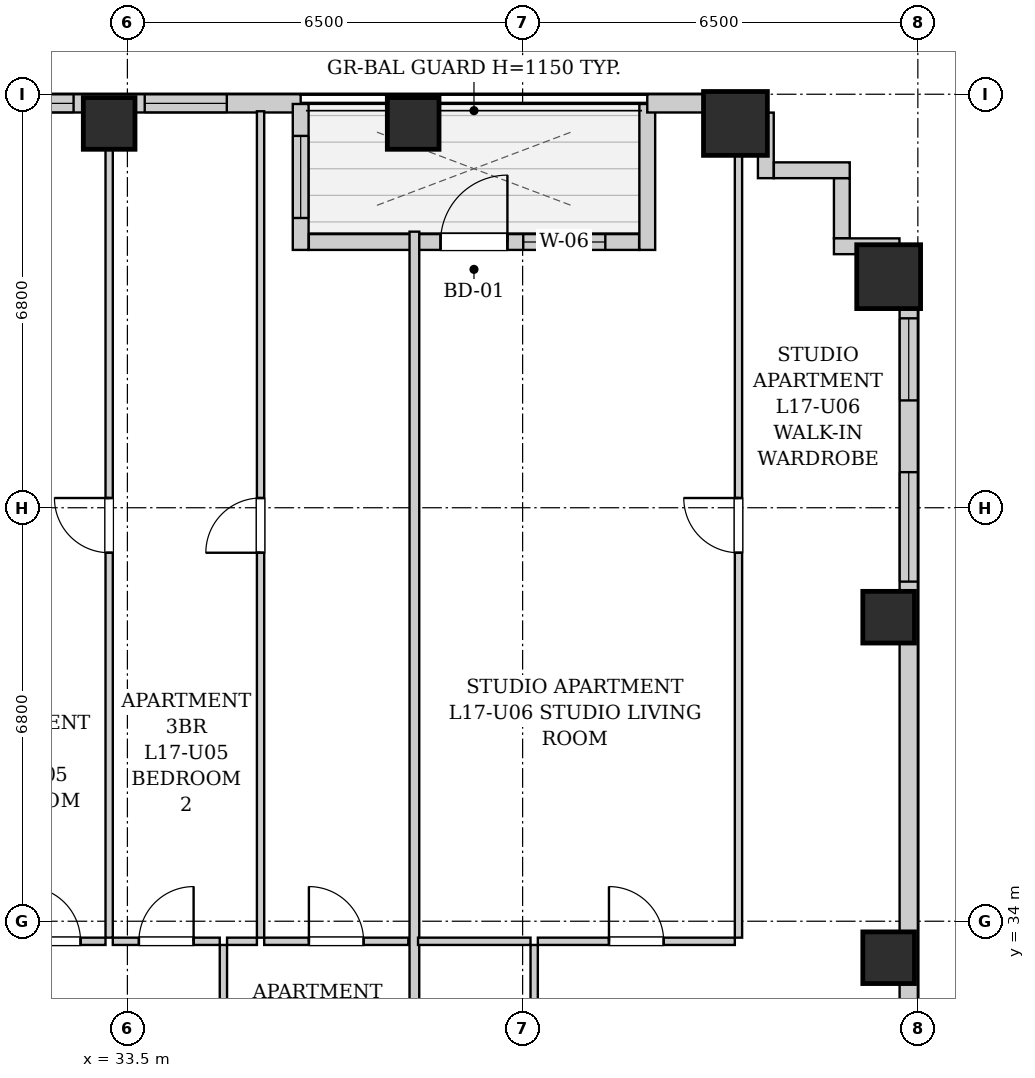
"""IFC4 building model, lengths in metres.
Left out: names, types, materials, properties, quantities, classifications, styles, units other than length and angle.
Written with IfcOpenShell. Run it as: python <this file> out.ifc"""

import sys

from ifc_helpers import new_model, si_unit, direction, frame, frame_2d, origin, origin_2d, place, context, subcontext, project, spatial, rectangle, extrude, element, fill, save


model = new_model("IFC4")
c1 = context("Model", 3, precision=1e-05, world=origin(), true_north=direction((0.0, 1.0)))
c2 = subcontext(c1, "Body", "Model", "MODEL_VIEW")
j1 = project(units=[si_unit("LENGTHUNIT", "METRE"), si_unit("PLANEANGLEUNIT", "RADIAN")], contexts=[c1])
p1 = place(None, origin())
s1 = spatial("IfcSite", under=j1, at=p1, CompositionType="ELEMENT")
p2 = place(p1, origin())
s2 = spatial("IfcBuilding", under=s1, at=p2, CompositionType="ELEMENT")
p3 = place(p2, frame((0.0, 0.0, 64.2)))
s3 = spatial("IfcBuildingStorey", under=s2, at=p3, CompositionType="ELEMENT", Elevation=64.2)
for number, where, z_axis, x_axis in (
    (1, (33.2, 47.12, 0.0), (0.0, 0.0, 1.0), (1.0, 0.0, 0.0)),
    (2, (38.2, 47.12, 0.0), (0.0, 0.0, 1.0), (1.0, 0.0, 0.0)),
):
    element("IfcColumn", number, at=place(p3, frame(where, z_axis=z_axis, x_axis=x_axis)), inside=s3, PredefinedType="COLUMN", context=c2, shape_type="SweptSolid", body=[
        extrude(rectangle(XDim=0.85, YDim=0.85, at=origin_2d()), origin(), (0.0, 0.0, 1.0), 3.2),
    ])
p4 = place(p3, frame((43.5, 47.12, 0.0), z_axis=(0.0, 0.0, 1.0), x_axis=(1.0, 0.0, 0.0)))
e3 = element("IfcColumn", 3, at=p4, inside=s3, PredefinedType="COLUMN", context=c2, shape_type="SweptSolid", body=[
    extrude(rectangle(XDim=1.05, YDim=1.05, at=origin_2d()), origin(), (0.0, 0.0, 1.0), 3.2),
])
for number, where, z_axis, x_axis in (
    (4, (46.02, 33.4, 0.0), (0.0, 0.0, 1.0), (1.0, 0.0, 0.0)),
    (5, (46.02, 39.0, 0.0), (0.0, 0.0, 1.0), (1.0, 0.0, 0.0)),
):
    element("IfcColumn", number, at=place(p3, frame(where, z_axis=z_axis, x_axis=x_axis)), inside=s3, PredefinedType="COLUMN", context=c2, shape_type="SweptSolid", body=[
        extrude(rectangle(XDim=0.85, YDim=0.85, at=origin_2d()), origin(), (0.0, 0.0, 1.0), 3.2),
    ])
p5 = place(p3, frame((46.02, 44.6, 0.0), z_axis=(0.0, 0.0, 1.0), x_axis=(1.0, 0.0, 0.0)))
e6 = element("IfcColumn", 6, at=p5, inside=s3, PredefinedType="COLUMN", context=c2, shape_type="SweptSolid", body=[
    extrude(rectangle(XDim=1.05, YDim=1.05, at=origin_2d()), origin(), (0.0, 0.0, 1.0), 3.2),
])
p6 = place(p3, frame((10.0, 47.45, 0.0), z_axis=(0.0, 0.0, 1.0), x_axis=(1.0, 0.0, 0.0)))
e7 = element("IfcWall", 7, at=p6, inside=s3, PredefinedType="SOLIDWALL", context=c2, shape_type="SweptSolid", body=[
    extrude(rectangle(XDim=26.35, YDim=0.3, at=frame_2d((13.175, 0.0))), origin(), (0.0, 0.0, 1.0), 1.975),
])
p7 = place(p6, frame((1.735, 0.0, 0.55)))
e8 = element("IfcOpeningElement", 8, at=p7, cuts=e7, PredefinedType="OPENING", context=c2, shape_type="SweptSolid", body=[
    extrude(rectangle(XDim=1.8, YDim=1.2, at=frame_2d((0.9, 0.6))), frame((0.0, 0.16, 0.0), z_axis=(0.0, -1.0, 0.0), x_axis=(1.0, 0.0, 0.0)), (0.0, 0.0, 1.0), 0.32),
])
p8 = place(p6, frame((5.415, 0.0, 0.55)))
e9 = element("IfcOpeningElement", 9, at=p8, cuts=e7, PredefinedType="OPENING", context=c2, shape_type="SweptSolid", body=[
    extrude(rectangle(XDim=1.8, YDim=1.2, at=frame_2d((0.9, 0.6))), frame((0.0, 0.16, 0.0), z_axis=(0.0, -1.0, 0.0), x_axis=(1.0, 0.0, 0.0)), (0.0, 0.0, 1.0), 0.32),
])
p9 = place(p6, frame((10.618, 0.0, 0.55)))
e10 = element("IfcOpeningElement", 10, at=p9, cuts=e7, PredefinedType="OPENING", context=c2, shape_type="SweptSolid", body=[
    extrude(rectangle(XDim=1.8, YDim=1.2, at=frame_2d((0.9, 0.6))), frame((0.0, 0.16, 0.0), z_axis=(0.0, -1.0, 0.0), x_axis=(1.0, 0.0, 0.0)), (0.0, 0.0, 1.0), 0.32),
])
p10 = place(p6, frame((17.696, 0.0, 0.55)))
e11 = element("IfcOpeningElement", 11, at=p10, cuts=e7, PredefinedType="OPENING", context=c2, shape_type="SweptSolid", body=[
    extrude(rectangle(XDim=1.8, YDim=1.2, at=frame_2d((0.9, 0.6))), frame((0.0, 0.16, 0.0), z_axis=(0.0, -1.0, 0.0), x_axis=(1.0, 0.0, 0.0)), (0.0, 0.0, 1.0), 0.32),
])
p11 = place(p6, frame((20.815, 0.0, 0.55)))
e12 = element("IfcOpeningElement", 12, at=p11, cuts=e7, PredefinedType="OPENING", context=c2, shape_type="SweptSolid", body=[
    extrude(rectangle(XDim=1.8, YDim=1.2, at=frame_2d((0.9, 0.6))), frame((0.0, 0.16, 0.0), z_axis=(0.0, -1.0, 0.0), x_axis=(1.0, 0.0, 0.0)), (0.0, 0.0, 1.0), 0.32),
])
p12 = place(p6, frame((23.785, 0.0, 0.55)))
e13 = element("IfcOpeningElement", 13, at=p12, cuts=e7, PredefinedType="OPENING", context=c2, shape_type="SweptSolid", body=[
    extrude(rectangle(XDim=1.35, YDim=1.2, at=frame_2d((0.675, 0.6))), frame((0.0, 0.16, 0.0), z_axis=(0.0, -1.0, 0.0), x_axis=(1.0, 0.0, 0.0)), (0.0, 0.0, 1.0), 0.32),
])
p13 = place(p3, frame((36.35, 47.44, 0.0), z_axis=(0.0, 0.0, 1.0), x_axis=(0.0, -1.0, 0.0)))
e14 = element("IfcWall", 14, at=p13, inside=s3, PredefinedType="SOLIDWALL", context=c2, shape_type="SweptSolid", body=[
    extrude(rectangle(XDim=2.4, YDim=0.26, at=frame_2d((1.2, 0.0))), origin(), (0.0, 0.0, 1.0), 2.94),
])
p14 = place(p13, frame((0.525, 0.0, 0.55)))
e15 = element("IfcOpeningElement", 15, at=p14, cuts=e14, PredefinedType="OPENING", context=c2, shape_type="SweptSolid", body=[
    extrude(rectangle(XDim=1.35, YDim=1.2, at=frame_2d((0.675, 0.6))), frame((0.0, 0.14, 0.0), z_axis=(0.0, -1.0, 0.0), x_axis=(1.0, 0.0, 0.0)), (0.0, 0.0, 1.0), 0.28),
])
p15 = place(p3, frame((36.484, 45.17, 0.0), z_axis=(0.0, 0.0, 1.0), x_axis=(1.0, 0.0, 0.0)))
e16 = element("IfcWall", 16, at=p15, inside=s3, PredefinedType="SOLIDWALL", context=c2, shape_type="SweptSolid", body=[
    extrude(rectangle(XDim=5.432, YDim=0.26, at=frame_2d((2.716, 0.0))), origin(), (0.0, 0.0, 1.0), 2.94),
])
p16 = place(p15, frame((2.166, 0.0, 0.0)))
e17 = element("IfcOpeningElement", 17, at=p16, cuts=e16, PredefinedType="OPENING", context=c2, shape_type="SweptSolid", body=[
    extrude(rectangle(XDim=1.1, YDim=2.0, at=frame_2d((0.55, 1.0))), frame((0.0, 0.14, 0.0), z_axis=(0.0, -1.0, 0.0), x_axis=(1.0, 0.0, 0.0)), (0.0, 0.0, 1.0), 0.28),
])
p17 = place(p15, frame((3.526, 0.0, 0.85)))
e18 = element("IfcOpeningElement", 18, at=p17, cuts=e16, PredefinedType="OPENING", context=c2, shape_type="SweptSolid", body=[
    extrude(rectangle(XDim=1.35, YDim=1.65, at=frame_2d((0.675, 0.825))), frame((0.0, 0.14, 0.0), z_axis=(0.0, -1.0, 0.0), x_axis=(1.0, 0.0, 0.0)), (0.0, 0.0, 1.0), 0.28),
])
p18 = place(p3, frame((42.05, 45.04, 0.0), z_axis=(0.0, 0.0, 1.0), x_axis=(0.0, 1.0, 0.0)))
e19 = element("IfcWall", 19, at=p18, inside=s3, PredefinedType="SOLIDWALL", context=c2, shape_type="SweptSolid", body=[
    extrude(rectangle(XDim=2.4, YDim=0.26, at=frame_2d((1.2, 0.0))), origin(), (0.0, 0.0, 1.0), 2.94),
])
p19 = place(p3, frame((42.05, 47.45, 0.0), z_axis=(0.0, 0.0, 1.0), x_axis=(1.0, 0.0, 0.0)))
e20 = element("IfcWall", 20, at=p19, inside=s3, PredefinedType="SOLIDWALL", context=c2, shape_type="SweptSolid", body=[
    extrude(rectangle(XDim=1.95, YDim=0.3, at=frame_2d((0.975, 0.0))), origin(), (0.0, 0.0, 1.0), 1.975),
])
p20 = place(p3, frame((46.35, 45.1, 0.0), z_axis=(0.0, 0.0, 1.0), x_axis=(0.0, -1.0, 0.0)))
e21 = element("IfcWall", 21, at=p20, inside=s3, PredefinedType="SOLIDWALL", context=c2, shape_type="SweptSolid", body=[
    extrude(rectangle(XDim=16.9, YDim=0.3, at=frame_2d((8.45, 0.0))), origin(), (0.0, 0.0, 1.0), 1.975),
])
p21 = place(p20, frame((3.715, 0.0, 0.55)))
e22 = element("IfcOpeningElement", 22, at=p21, cuts=e21, PredefinedType="OPENING", context=c2, shape_type="SweptSolid", body=[
    extrude(rectangle(XDim=1.8, YDim=1.2, at=frame_2d((0.9, 0.6))), frame((0.0, 0.16, 0.0), z_axis=(0.0, -1.0, 0.0), x_axis=(1.0, 0.0, 0.0)), (0.0, 0.0, 1.0), 0.32),
])
p22 = place(p20, frame((1.185, 0.0, 0.55)))
e23 = element("IfcOpeningElement", 23, at=p22, cuts=e21, PredefinedType="OPENING", context=c2, shape_type="SweptSolid", body=[
    extrude(rectangle(XDim=1.35, YDim=1.2, at=frame_2d((0.675, 0.6))), frame((0.0, 0.16, 0.0), z_axis=(0.0, -1.0, 0.0), x_axis=(1.0, 0.0, 0.0)), (0.0, 0.0, 1.0), 0.32),
])
p23 = place(p3, frame((44.0, 47.298, 0.0), z_axis=(0.0, 0.0, 1.0), x_axis=(0.0, -1.0, 0.0)))
e24 = element("IfcWall", 24, at=p23, inside=s3, PredefinedType="SOLIDWALL", context=c2, shape_type="SweptSolid", body=[
    extrude(rectangle(XDim=1.078, YDim=0.26, at=frame_2d((0.539, 0.0))), origin(), (0.0, 0.0, 1.0), 2.94),
])
p24 = place(p3, frame((44.132, 46.35, 0.0), z_axis=(0.0, 0.0, 1.0), x_axis=(1.0, 0.0, 0.0)))
e25 = element("IfcWall", 25, at=p24, inside=s3, PredefinedType="SOLIDWALL", context=c2, shape_type="SweptSolid", body=[
    extrude(rectangle(XDim=1.248, YDim=0.26, at=frame_2d((0.624, 0.0))), origin(), (0.0, 0.0, 1.0), 2.94),
])
p25 = place(p3, frame((45.25, 46.218, 0.0), z_axis=(0.0, 0.0, 1.0), x_axis=(0.0, -1.0, 0.0)))
e26 = element("IfcWall", 26, at=p25, inside=s3, PredefinedType="SOLIDWALL", context=c2, shape_type="SweptSolid", body=[
    extrude(rectangle(XDim=0.986, YDim=0.26, at=frame_2d((0.493, 0.0))), origin(), (0.0, 0.0, 1.0), 2.94),
])
p26 = place(p3, frame((45.12, 45.1, 0.0), z_axis=(0.0, 0.0, 1.0), x_axis=(1.0, 0.0, 0.0)))
e27 = element("IfcWall", 27, at=p26, inside=s3, PredefinedType="SOLIDWALL", context=c2, shape_type="SweptSolid", body=[
    extrude(rectangle(XDim=1.078, YDim=0.26, at=frame_2d((0.539, 0.0))), origin(), (0.0, 0.0, 1.0), 2.94),
])
p27 = place(p3, frame((35.079, 30.76, 0.0), z_axis=(0.0, 0.0, 1.0), x_axis=(0.0, 1.0, 0.0)))
e28 = element("IfcWall", 28, at=p27, inside=s3, PredefinedType="PARTITIONING", context=c2, shape_type="SweptSolid", body=[
    extrude(rectangle(XDim=2.85, YDim=0.12, at=frame_2d((1.425, 0.0))), origin(), (0.0, 0.0, 1.0), 2.94),
])
p28 = place(p27, frame((0.975, 0.0, 0.0)))
e29 = element("IfcOpeningElement", 29, at=p28, cuts=e28, PredefinedType="OPENING", context=c2, shape_type="SweptSolid", body=[
    extrude(rectangle(XDim=0.9, YDim=2.05, at=frame_2d((0.45, 1.025))), frame((0.0, 0.07, 0.0), z_axis=(0.0, -1.0, 0.0), x_axis=(1.0, 0.0, 0.0)), (0.0, 0.0, 1.0), 0.14),
])
p29 = place(p3, frame((31.419, 33.67, 0.0), z_axis=(0.0, 0.0, 1.0), x_axis=(1.0, 0.0, 0.0)))
e30 = element("IfcWall", 30, at=p29, inside=s3, PredefinedType="PARTITIONING", context=c2, shape_type="SweptSolid", body=[
    extrude(rectangle(XDim=1.721, YDim=0.12, at=frame_2d((0.86, 0.0))), origin(), (0.0, 0.0, 1.0), 2.94),
])
p30 = place(p29, frame((0.411, 0.0, 0.0)))
e31 = element("IfcOpeningElement", 31, at=p30, cuts=e30, PredefinedType="OPENING", context=c2, shape_type="SweptSolid", body=[
    extrude(rectangle(XDim=0.9, YDim=2.05, at=frame_2d((0.45, 1.025))), frame((0.0, 0.07, 0.0), z_axis=(0.0, -1.0, 0.0), x_axis=(1.0, 0.0, 0.0)), (0.0, 0.0, 1.0), 0.14),
])
p31 = place(p3, frame((33.26, 33.67, 0.0), z_axis=(0.0, 0.0, 1.0), x_axis=(1.0, 0.0, 0.0)))
e32 = element("IfcWall", 32, at=p31, inside=s3, PredefinedType="PARTITIONING", context=c2, shape_type="SweptSolid", body=[
    extrude(rectangle(XDim=1.759, YDim=0.12, at=frame_2d((0.879, 0.0))), origin(), (0.0, 0.0, 1.0), 2.94),
])
p32 = place(p31, frame((0.429, 0.0, 0.0)))
e33 = element("IfcOpeningElement", 33, at=p32, cuts=e32, PredefinedType="OPENING", context=c2, shape_type="SweptSolid", body=[
    extrude(rectangle(XDim=0.9, YDim=2.05, at=frame_2d((0.45, 1.025))), frame((0.0, 0.07, 0.0), z_axis=(0.0, -1.0, 0.0), x_axis=(1.0, 0.0, 0.0)), (0.0, 0.0, 1.0), 0.14),
])
p33 = place(p3, frame((35.139, 33.67, 0.0), z_axis=(0.0, 0.0, 1.0), x_axis=(1.0, 0.0, 0.0)))
e34 = element("IfcWall", 34, at=p33, inside=s3, PredefinedType="PARTITIONING", context=c2, shape_type="SweptSolid", body=[
    extrude(rectangle(XDim=0.491, YDim=0.12, at=frame_2d((0.246, 0.0))), origin(), (0.0, 0.0, 1.0), 2.94),
])
p34 = place(p3, frame((35.75, 33.67, 0.0), z_axis=(0.0, 0.0, 1.0), x_axis=(1.0, 0.0, 0.0)))
e35 = element("IfcWall", 35, at=p34, inside=s3, PredefinedType="PARTITIONING", context=c2, shape_type="SweptSolid", body=[
    extrude(rectangle(XDim=2.37, YDim=0.12, at=frame_2d((1.185, 0.0))), origin(), (0.0, 0.0, 1.0), 2.94),
])
p35 = place(p34, frame((0.735, 0.0, 0.0)))
e36 = element("IfcOpeningElement", 36, at=p35, cuts=e35, PredefinedType="OPENING", context=c2, shape_type="SweptSolid", body=[
    extrude(rectangle(XDim=0.9, YDim=2.05, at=frame_2d((0.45, 1.025))), frame((0.0, 0.07, 0.0), z_axis=(0.0, -1.0, 0.0), x_axis=(1.0, 0.0, 0.0)), (0.0, 0.0, 1.0), 0.14),
])
p36 = place(p3, frame((33.2, 33.73, 0.0), z_axis=(0.0, 0.0, 1.0), x_axis=(0.0, 1.0, 0.0)))
e37 = element("IfcWall", 37, at=p36, inside=s3, PredefinedType="PARTITIONING", context=c2, shape_type="SweptSolid", body=[
    extrude(rectangle(XDim=13.59, YDim=0.12, at=frame_2d((6.795, 0.0))), origin(), (0.0, 0.0, 1.0), 2.232),
])
p37 = place(p36, frame((6.33, 0.0, 0.0)))
e38 = element("IfcOpeningElement", 38, at=p37, cuts=e37, PredefinedType="OPENING", context=c2, shape_type="SweptSolid", body=[
    extrude(rectangle(XDim=0.9, YDim=2.05, at=frame_2d((0.45, 1.025))), frame((0.0, 0.07, 0.0), z_axis=(0.0, -1.0, 0.0), x_axis=(1.0, 0.0, 0.0)), (0.0, 0.0, 1.0), 0.14),
])
p38 = place(p3, frame((35.69, 33.73, 0.0), z_axis=(0.0, 0.0, 1.0), x_axis=(0.0, 1.0, 0.0)))
e39 = element("IfcWall", 39, at=p38, inside=s3, PredefinedType="PARTITIONING", context=c2, shape_type="SweptSolid", body=[
    extrude(rectangle(XDim=13.59, YDim=0.12, at=frame_2d((6.795, 0.0))), origin(), (0.0, 0.0, 1.0), 2.94),
])
p39 = place(p38, frame((6.33, 0.0, 0.0)))
e40 = element("IfcOpeningElement", 40, at=p39, cuts=e39, PredefinedType="OPENING", context=c2, shape_type="SweptSolid", body=[
    extrude(rectangle(XDim=0.9, YDim=2.05, at=frame_2d((0.45, 1.025))), frame((0.0, 0.07, 0.0), z_axis=(0.0, -1.0, 0.0), x_axis=(1.0, 0.0, 0.0)), (0.0, 0.0, 1.0), 0.14),
])
p40 = place(p3, frame((38.22, 30.76, 0.0), z_axis=(0.0, 0.0, 1.0), x_axis=(0.0, 1.0, 0.0)))
e41 = element("IfcWall", 41, at=p40, inside=s3, PredefinedType="PARTITIONING", context=c2, shape_type="SweptSolid", body=[
    extrude(rectangle(XDim=14.58, YDim=0.16, at=frame_2d((7.29, 0.0))), origin(), (0.0, 0.0, 1.0), 2.94),
])
p41 = place(p3, frame((40.19, 30.76, 0.0), z_axis=(0.0, 0.0, 1.0), x_axis=(0.0, 1.0, 0.0)))
e42 = element("IfcWall", 42, at=p41, inside=s3, PredefinedType="PARTITIONING", context=c2, shape_type="SweptSolid", body=[
    extrude(rectangle(XDim=2.85, YDim=0.12, at=frame_2d((1.425, 0.0))), origin(), (0.0, 0.0, 1.0), 2.94),
])
p42 = place(p41, frame((0.995, 0.0, 0.0)))
e43 = element("IfcOpeningElement", 43, at=p42, cuts=e42, PredefinedType="OPENING", context=c2, shape_type="SweptSolid", body=[
    extrude(rectangle(XDim=0.86, YDim=2.05, at=frame_2d((0.43, 1.025))), frame((0.0, 0.07, 0.0), z_axis=(0.0, -1.0, 0.0), x_axis=(1.0, 0.0, 0.0)), (0.0, 0.0, 1.0), 0.14),
])
p43 = place(p3, frame((38.28, 33.67, 0.0), z_axis=(0.0, 0.0, 1.0), x_axis=(1.0, 0.0, 0.0)))
e44 = element("IfcWall", 44, at=p43, inside=s3, PredefinedType="PARTITIONING", context=c2, shape_type="SweptSolid", body=[
    extrude(rectangle(XDim=1.85, YDim=0.12, at=frame_2d((0.925, 0.0))), origin(), (0.0, 0.0, 1.0), 2.94),
])
p44 = place(p3, frame((40.25, 33.67, 0.0), z_axis=(0.0, 0.0, 1.0), x_axis=(1.0, 0.0, 0.0)))
e45 = element("IfcWall", 45, at=p44, inside=s3, PredefinedType="PARTITIONING", context=c2, shape_type="SweptSolid", body=[
    extrude(rectangle(XDim=3.24, YDim=0.12, at=frame_2d((1.62, 0.0))), origin(), (0.0, 0.0, 1.0), 2.94),
])
p45 = place(p44, frame((1.17, 0.0, 0.0)))
e46 = element("IfcOpeningElement", 46, at=p45, cuts=e45, PredefinedType="OPENING", context=c2, shape_type="SweptSolid", body=[
    extrude(rectangle(XDim=0.9, YDim=2.05, at=frame_2d((0.45, 1.025))), frame((0.0, 0.07, 0.0), z_axis=(0.0, -1.0, 0.0), x_axis=(1.0, 0.0, 0.0)), (0.0, 0.0, 1.0), 0.14),
])
p46 = place(p3, frame((43.55, 33.73, 0.0), z_axis=(0.0, 0.0, 1.0), x_axis=(0.0, 1.0, 0.0)))
e47 = element("IfcWall", 47, at=p46, inside=s3, PredefinedType="PARTITIONING", context=c2, shape_type="SweptSolid", body=[
    extrude(rectangle(XDim=13.59, YDim=0.12, at=frame_2d((6.795, 0.0))), origin(), (0.0, 0.0, 1.0), 2.94),
])
p47 = place(p46, frame((6.33, 0.0, 0.0)))
e48 = element("IfcOpeningElement", 48, at=p47, cuts=e47, PredefinedType="OPENING", context=c2, shape_type="SweptSolid", body=[
    extrude(rectangle(XDim=0.9, YDim=2.05, at=frame_2d((0.45, 1.025))), frame((0.0, 0.07, 0.0), z_axis=(0.0, -1.0, 0.0), x_axis=(1.0, 0.0, 0.0)), (0.0, 0.0, 1.0), 0.14),
])
p48 = place(p30, origin())
e49 = element("IfcDoor", 49, at=p48, inside=s3, OperationType="SINGLE_SWING_LEFT", PredefinedType="DOOR", context=c2, shape_type="SweptSolid", body=[
    extrude(rectangle(XDim=0.9, YDim=2.05, at=frame_2d((0.45, 1.025))), frame((0.0, 0.025, 0.0), z_axis=(0.0, -1.0, 0.0), x_axis=(1.0, 0.0, 0.0)), (0.0, 0.0, 1.0), 0.05),
])
fill(e31, e49)
p49 = place(p32, origin())
e50 = element("IfcDoor", 50, at=p49, inside=s3, OperationType="SINGLE_SWING_RIGHT", PredefinedType="DOOR", context=c2, shape_type="SweptSolid", body=[
    extrude(rectangle(XDim=0.9, YDim=2.05, at=frame_2d((0.45, 1.025))), frame((0.0, 0.025, 0.0), z_axis=(0.0, -1.0, 0.0), x_axis=(1.0, 0.0, 0.0)), (0.0, 0.0, 1.0), 0.05),
])
fill(e33, e50)
p50 = place(p35, origin())
e51 = element("IfcDoor", 51, at=p50, inside=s3, OperationType="SINGLE_SWING_LEFT", PredefinedType="DOOR", context=c2, shape_type="SweptSolid", body=[
    extrude(rectangle(XDim=0.9, YDim=2.05, at=frame_2d((0.45, 1.025))), frame((0.0, 0.025, 0.0), z_axis=(0.0, -1.0, 0.0), x_axis=(1.0, 0.0, 0.0)), (0.0, 0.0, 1.0), 0.05),
])
fill(e36, e51)
p51 = place(p37, origin())
e52 = element("IfcDoor", 52, at=p51, inside=s3, OperationType="SINGLE_SWING_RIGHT", PredefinedType="DOOR", context=c2, shape_type="SweptSolid", body=[
    extrude(rectangle(XDim=0.9, YDim=2.05, at=frame_2d((0.45, 1.025))), frame((0.0, 0.025, 0.0), z_axis=(0.0, -1.0, 0.0), x_axis=(1.0, 0.0, 0.0)), (0.0, 0.0, 1.0), 0.05),
])
fill(e38, e52)
p52 = place(p39, origin())
e53 = element("IfcDoor", 53, at=p52, inside=s3, OperationType="SINGLE_SWING_LEFT", PredefinedType="DOOR", context=c2, shape_type="SweptSolid", body=[
    extrude(rectangle(XDim=0.9, YDim=2.05, at=frame_2d((0.45, 1.025))), frame((0.0, 0.025, 0.0), z_axis=(0.0, -1.0, 0.0), x_axis=(1.0, 0.0, 0.0)), (0.0, 0.0, 1.0), 0.05),
])
fill(e40, e53)
p53 = place(p45, origin())
e54 = element("IfcDoor", 54, at=p53, inside=s3, OperationType="SINGLE_SWING_LEFT", PredefinedType="DOOR", context=c2, shape_type="SweptSolid", body=[
    extrude(rectangle(XDim=0.9, YDim=2.05, at=frame_2d((0.45, 1.025))), frame((0.0, 0.025, 0.0), z_axis=(0.0, -1.0, 0.0), x_axis=(1.0, 0.0, 0.0)), (0.0, 0.0, 1.0), 0.05),
])
fill(e46, e54)
p54 = place(p47, origin())
e55 = element("IfcDoor", 55, at=p54, inside=s3, OperationType="SINGLE_SWING_RIGHT", PredefinedType="DOOR", context=c2, shape_type="SweptSolid", body=[
    extrude(rectangle(XDim=0.9, YDim=2.05, at=frame_2d((0.45, 1.025))), frame((0.0, 0.025, 0.0), z_axis=(0.0, -1.0, 0.0), x_axis=(1.0, 0.0, 0.0)), (0.0, 0.0, 1.0), 0.05),
])
fill(e48, e55)
p55 = place(p16, origin())
e56 = element("IfcDoor", 56, at=p55, inside=s3, OperationType="SINGLE_SWING_RIGHT", PredefinedType="DOOR", context=c2, shape_type="SweptSolid", body=[
    extrude(rectangle(XDim=1.1, YDim=2.0, at=frame_2d((0.55, 1.0))), frame((0.0, 0.025, 0.0), z_axis=(0.0, -1.0, 0.0), x_axis=(1.0, 0.0, 0.0)), (0.0, 0.0, 1.0), 0.05),
])
fill(e17, e56)
p56 = place(p11, origin())
e57 = element("IfcWindow", 57, at=p56, inside=s3, PartitioningType="DOUBLE_PANEL_VERTICAL", PredefinedType="WINDOW", context=c2, shape_type="SweptSolid", body=[
    extrude(rectangle(XDim=1.8, YDim=1.2, at=frame_2d((0.9, 0.6))), frame((0.0, 0.03, 0.0), z_axis=(0.0, -1.0, 0.0), x_axis=(1.0, 0.0, 0.0)), (0.0, 0.0, 1.0), 0.06),
])
fill(e12, e57)
p57 = place(p12, origin())
e58 = element("IfcWindow", 58, at=p57, inside=s3, PartitioningType="SINGLE_PANEL", PredefinedType="WINDOW", context=c2, shape_type="SweptSolid", body=[
    extrude(rectangle(XDim=1.35, YDim=1.2, at=frame_2d((0.675, 0.6))), frame((0.0, 0.03, 0.0), z_axis=(0.0, -1.0, 0.0), x_axis=(1.0, 0.0, 0.0)), (0.0, 0.0, 1.0), 0.06),
])
fill(e13, e58)
p58 = place(p14, origin())
e59 = element("IfcWindow", 59, at=p58, inside=s3, PartitioningType="SINGLE_PANEL", PredefinedType="WINDOW", context=c2, shape_type="SweptSolid", body=[
    extrude(rectangle(XDim=1.35, YDim=1.2, at=frame_2d((0.675, 0.6))), frame((0.0, 0.03, 0.0), z_axis=(0.0, -1.0, 0.0), x_axis=(1.0, 0.0, 0.0)), (0.0, 0.0, 1.0), 0.06),
])
fill(e15, e59)
p59 = place(p17, origin())
e60 = element("IfcWindow", 60, at=p59, inside=s3, PartitioningType="SINGLE_PANEL", PredefinedType="WINDOW", context=c2, shape_type="SweptSolid", body=[
    extrude(rectangle(XDim=1.35, YDim=1.65, at=frame_2d((0.675, 0.825))), frame((0.0, 0.03, 0.0), z_axis=(0.0, -1.0, 0.0), x_axis=(1.0, 0.0, 0.0)), (0.0, 0.0, 1.0), 0.06),
])
fill(e18, e60)
p60 = place(p21, origin())
e61 = element("IfcWindow", 61, at=p60, inside=s3, PartitioningType="DOUBLE_PANEL_VERTICAL", PredefinedType="WINDOW", context=c2, shape_type="SweptSolid", body=[
    extrude(rectangle(XDim=1.8, YDim=1.2, at=frame_2d((0.9, 0.6))), frame((0.0, 0.03, 0.0), z_axis=(0.0, -1.0, 0.0), x_axis=(1.0, 0.0, 0.0)), (0.0, 0.0, 1.0), 0.06),
])
fill(e22, e61)
p61 = place(p22, origin())
e62 = element("IfcWindow", 62, at=p61, inside=s3, PartitioningType="SINGLE_PANEL", PredefinedType="WINDOW", context=c2, shape_type="SweptSolid", body=[
    extrude(rectangle(XDim=1.35, YDim=1.2, at=frame_2d((0.675, 0.6))), frame((0.0, 0.03, 0.0), z_axis=(0.0, -1.0, 0.0), x_axis=(1.0, 0.0, 0.0)), (0.0, 0.0, 1.0), 0.06),
])
fill(e23, e62)
save(model, sys.argv[1])
